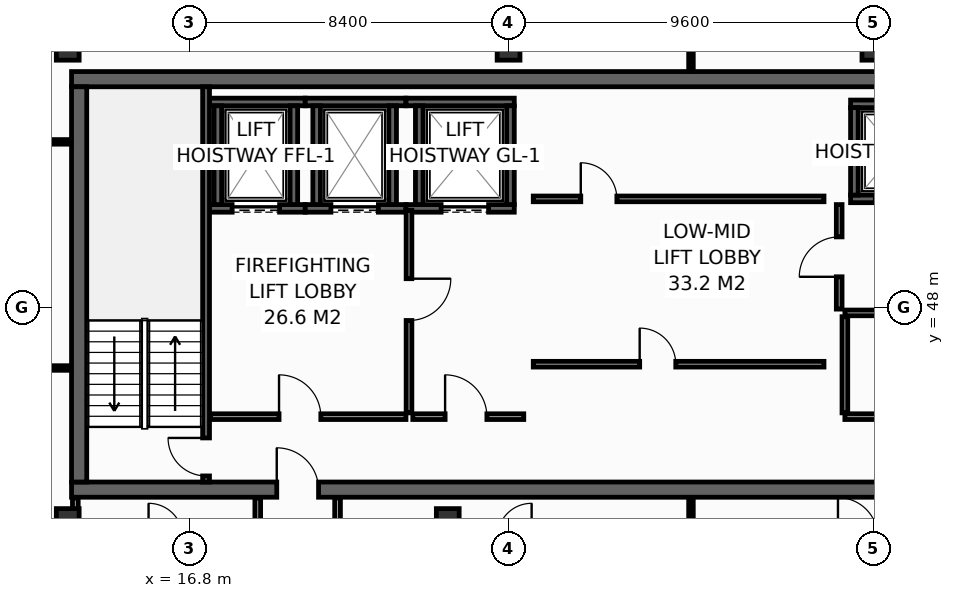
"""IFC4 building model, lengths in metres.
Left out: names, types, materials, properties, quantities, classifications, styles, units other than length and angle.
Written with IfcOpenShell. Run it as: python <this file> out.ifc"""

import sys

from ifc_helpers import new_model, si_unit, direction, frame, frame_2d, origin, origin_2d, place, context, subcontext, project, spatial, rectangle, hollow_rectangle, extrude, element, fill, save


model = new_model("IFC4")
c1 = context("Model", 3, precision=1e-05, world=origin(), true_north=direction((0.0, 1.0)))
c2 = subcontext(c1, "Body", "Model", "MODEL_VIEW")
j1 = project(units=[si_unit("LENGTHUNIT", "METRE"), si_unit("PLANEANGLEUNIT", "RADIAN")], contexts=[c1])
p1 = place(None, origin())
s1 = spatial("IfcSite", under=j1, at=p1, CompositionType="ELEMENT")
p2 = place(p1, origin())
s2 = spatial("IfcBuilding", under=s1, at=p2, CompositionType="ELEMENT")
p3 = place(p2, frame((0.0, 0.0, 310.4)))
s3 = spatial("IfcBuildingStorey", under=s2, at=p3, CompositionType="ELEMENT", Elevation=310.4)
p4 = place(p3, frame((13.7, 43.2, 0.0), z_axis=(0.0, 0.0, 1.0), x_axis=(1.0, 0.0, 0.0)))
e1 = element("IfcWall", 1, at=p4, inside=s3, PredefinedType="SHEAR", context=c2, shape_type="SweptSolid", body=[
    extrude(rectangle(XDim=32.5, YDim=0.4, at=frame_2d((16.25, 0.0))), origin(), (0.0, 0.0, 1.0), 3.55),
])
p5 = place(p4, frame((5.4, 0.0, 0.0)))
e2 = element("IfcOpeningElement", 2, at=p5, cuts=e1, PredefinedType="OPENING", context=c2, shape_type="SweptSolid", body=[
    extrude(rectangle(XDim=1.1, YDim=2.15, at=frame_2d((0.55, 1.075))), frame((0.0, 0.21, 0.0), z_axis=(0.0, -1.0, 0.0), x_axis=(1.0, 0.0, 0.0)), (0.0, 0.0, 1.0), 0.42),
])
p6 = place(p4, frame((25.6, 0.0, 0.0)))
e3 = element("IfcOpeningElement", 3, at=p6, cuts=e1, PredefinedType="OPENING", context=c2, shape_type="SweptSolid", body=[
    extrude(rectangle(XDim=1.1, YDim=2.15, at=frame_2d((0.55, 1.075))), frame((0.0, 0.21, 0.0), z_axis=(0.0, -1.0, 0.0), x_axis=(1.0, 0.0, 0.0)), (0.0, 0.0, 1.0), 0.42),
])
p7 = place(p3, frame((13.7, 54.0, 0.0), z_axis=(0.0, 0.0, 1.0), x_axis=(1.0, 0.0, 0.0)))
e4 = element("IfcWall", 4, at=p7, inside=s3, PredefinedType="SHEAR", context=c2, shape_type="SweptSolid", body=[
    extrude(rectangle(XDim=32.5, YDim=0.4, at=frame_2d((16.25, 0.0))), origin(), (0.0, 0.0, 1.0), 3.55),
])
p8 = place(p3, frame((13.9, 43.4, 0.0), z_axis=(0.0, 0.0, 1.0), x_axis=(0.0, 1.0, 0.0)))
e5 = element("IfcWall", 5, at=p8, inside=s3, PredefinedType="SHEAR", context=c2, shape_type="SweptSolid", body=[
    extrude(rectangle(XDim=10.4, YDim=0.4, at=frame_2d((5.2, 0.0))), origin(), (0.0, 0.0, 1.0), 3.55),
])
for number, where, z_axis, x_axis in (
    (6, (13.6, 54.8, 0.0), (0.0, 0.0, 1.0), (1.0, 0.0, 0.0)),
    (7, (25.2, 54.8, 0.0), (0.0, 0.0, 1.0), (1.0, 0.0, 0.0)),
    (8, (34.8, 54.8, 0.0), (0.0, 0.0, 1.0), (1.0, 0.0, 0.0)),
    (9, (13.6, 42.4, 0.0), (0.0, 0.0, 1.0), (1.0, 0.0, 0.0)),
    (10, (23.6, 42.4, 0.0), (0.0, 0.0, 1.0), (1.0, 0.0, 0.0)),
):
    element("IfcColumn", number, at=place(p3, frame(where, z_axis=z_axis, x_axis=x_axis)), inside=s3, PredefinedType="COLUMN", context=c2, shape_type="SweptSolid", body=[
        extrude(hollow_rectangle(XDim=0.6, YDim=0.6, WallThickness=0.028, at=origin_2d()), origin(), (0.0, 0.0, 1.0), 3.8),
    ])
p9 = place(p3, frame((17.33, 50.6, 0.0), z_axis=(0.0, 0.0, 1.0), x_axis=(1.0, 0.0, 0.0)))
e11 = element("IfcWall", 11, at=p9, inside=s3, PredefinedType="SHEAR", context=c2, shape_type="SweptSolid", body=[
    extrude(rectangle(XDim=2.52, YDim=0.2, at=frame_2d((1.26, 0.0))), origin(), (0.0, 0.0, 1.0), 3.55),
])
p10 = place(p9, frame((0.595, 0.0, 0.0)))
e12 = element("IfcOpeningElement", 12, at=p10, cuts=e11, PredefinedType="OPENING", context=c2, shape_type="SweptSolid", body=[
    extrude(rectangle(XDim=1.25, YDim=2.3, at=frame_2d((0.625, 1.15))), frame((0.0, 0.11, 0.0), z_axis=(0.0, -1.0, 0.0), x_axis=(1.0, 0.0, 0.0)), (0.0, 0.0, 1.0), 0.22),
])
p11 = place(p3, frame((17.33, 53.4, 0.0), z_axis=(0.0, 0.0, 1.0), x_axis=(1.0, 0.0, 0.0)))
e13 = element("IfcWall", 13, at=p11, inside=s3, PredefinedType="SHEAR", context=c2, shape_type="SweptSolid", body=[
    extrude(rectangle(XDim=2.52, YDim=0.2, at=frame_2d((1.26, 0.0))), origin(), (0.0, 0.0, 1.0), 3.55),
])
for number, where, z_axis, x_axis in (
    (14, (17.55, 50.7, 0.0), (0.0, 0.0, 1.0), (0.0, 1.0, 0.0)),
    (15, (19.55, 50.7, 0.0), (0.0, 0.0, 1.0), (0.0, 1.0, 0.0)),
):
    element("IfcWall", number, at=place(p3, frame(where, z_axis=z_axis, x_axis=x_axis)), inside=s3, PredefinedType="SHEAR", context=c2, shape_type="SweptSolid", body=[
        extrude(rectangle(XDim=2.6, YDim=0.2, at=frame_2d((1.3, 0.0))), origin(), (0.0, 0.0, 1.0), 3.55),
    ])
p12 = place(p3, frame((19.85, 50.6, 0.0), z_axis=(0.0, 0.0, 1.0), x_axis=(1.0, 0.0, 0.0)))
e16 = element("IfcWall", 16, at=p12, inside=s3, PredefinedType="SHEAR", context=c2, shape_type="SweptSolid", body=[
    extrude(rectangle(XDim=2.65, YDim=0.2, at=frame_2d((1.325, 0.0))), origin(), (0.0, 0.0, 1.0), 3.55),
])
p13 = place(p12, frame((0.675, 0.0, 0.0)))
e17 = element("IfcOpeningElement", 17, at=p13, cuts=e16, PredefinedType="OPENING", context=c2, shape_type="SweptSolid", body=[
    extrude(rectangle(XDim=1.25, YDim=2.3, at=frame_2d((0.625, 1.15))), frame((0.0, 0.11, 0.0), z_axis=(0.0, -1.0, 0.0), x_axis=(1.0, 0.0, 0.0)), (0.0, 0.0, 1.0), 0.22),
])
p14 = place(p3, frame((19.85, 53.4, 0.0), z_axis=(0.0, 0.0, 1.0), x_axis=(1.0, 0.0, 0.0)))
e18 = element("IfcWall", 18, at=p14, inside=s3, PredefinedType="SHEAR", context=c2, shape_type="SweptSolid", body=[
    extrude(rectangle(XDim=2.65, YDim=0.2, at=frame_2d((1.325, 0.0))), origin(), (0.0, 0.0, 1.0), 3.55),
])
for number, where, z_axis, x_axis in (
    (19, (20.15, 50.7, 0.0), (0.0, 0.0, 1.0), (0.0, 1.0, 0.0)),
    (20, (22.15, 50.7, 0.0), (0.0, 0.0, 1.0), (0.0, 1.0, 0.0)),
):
    element("IfcWall", number, at=place(p3, frame(where, z_axis=z_axis, x_axis=x_axis)), inside=s3, PredefinedType="SHEAR", context=c2, shape_type="SweptSolid", body=[
        extrude(rectangle(XDim=2.6, YDim=0.2, at=frame_2d((1.3, 0.0))), origin(), (0.0, 0.0, 1.0), 3.55),
    ])
p15 = place(p3, frame((22.5, 50.6, 0.0), z_axis=(0.0, 0.0, 1.0), x_axis=(1.0, 0.0, 0.0)))
e21 = element("IfcWall", 21, at=p15, inside=s3, PredefinedType="SHEAR", context=c2, shape_type="SweptSolid", body=[
    extrude(rectangle(XDim=2.85, YDim=0.2, at=frame_2d((1.425, 0.0))), origin(), (0.0, 0.0, 1.0), 3.55),
])
p16 = place(p15, frame((0.925, 0.0, 0.0)))
e22 = element("IfcOpeningElement", 22, at=p16, cuts=e21, PredefinedType="OPENING", context=c2, shape_type="SweptSolid", body=[
    extrude(rectangle(XDim=1.25, YDim=2.3, at=frame_2d((0.625, 1.15))), frame((0.0, 0.11, 0.0), z_axis=(0.0, -1.0, 0.0), x_axis=(1.0, 0.0, 0.0)), (0.0, 0.0, 1.0), 0.22),
])
p17 = place(p3, frame((22.5, 53.4, 0.0), z_axis=(0.0, 0.0, 1.0), x_axis=(1.0, 0.0, 0.0)))
e23 = element("IfcWall", 23, at=p17, inside=s3, PredefinedType="SHEAR", context=c2, shape_type="SweptSolid", body=[
    extrude(rectangle(XDim=2.85, YDim=0.2, at=frame_2d((1.425, 0.0))), origin(), (0.0, 0.0, 1.0), 3.55),
])
for number, where, z_axis, x_axis in (
    (24, (22.85, 50.7, 0.0), (0.0, 0.0, 1.0), (0.0, 1.0, 0.0)),
    (25, (25.25, 50.7, 0.0), (0.0, 0.0, 1.0), (0.0, 1.0, 0.0)),
):
    element("IfcWall", number, at=place(p3, frame(where, z_axis=z_axis, x_axis=x_axis)), inside=s3, PredefinedType="SHEAR", context=c2, shape_type="SweptSolid", body=[
        extrude(rectangle(XDim=2.6, YDim=0.2, at=frame_2d((1.3, 0.0))), origin(), (0.0, 0.0, 1.0), 3.55),
    ])
p18 = place(p3, frame((34.2, 50.85, 0.0), z_axis=(0.0, 0.0, 1.0), x_axis=(1.0, 0.0, 0.0)))
e26 = element("IfcWall", 26, at=p18, inside=s3, PredefinedType="SHEAR", context=c2, shape_type="SweptSolid", body=[
    extrude(rectangle(XDim=2.575, YDim=0.2, at=frame_2d((1.288, 0.0))), origin(), (0.0, 0.0, 1.0), 3.55),
])
p19 = place(p18, frame((0.65, 0.0, 0.0)))
e27 = element("IfcOpeningElement", 27, at=p19, cuts=e26, PredefinedType="OPENING", context=c2, shape_type="SweptSolid", body=[
    extrude(rectangle(XDim=1.1, YDim=2.2, at=frame_2d((0.55, 1.1))), frame((0.0, 0.11, 0.0), z_axis=(0.0, -1.0, 0.0), x_axis=(1.0, 0.0, 0.0)), (0.0, 0.0, 1.0), 0.22),
])
p20 = place(p3, frame((34.2, 53.35, 0.0), z_axis=(0.0, 0.0, 1.0), x_axis=(1.0, 0.0, 0.0)))
e28 = element("IfcWall", 28, at=p20, inside=s3, PredefinedType="SHEAR", context=c2, shape_type="SweptSolid", body=[
    extrude(rectangle(XDim=2.575, YDim=0.2, at=frame_2d((1.288, 0.0))), origin(), (0.0, 0.0, 1.0), 3.55),
])
p21 = place(p3, frame((34.3, 50.95, 0.0), z_axis=(0.0, 0.0, 1.0), x_axis=(0.0, 1.0, 0.0)))
e29 = element("IfcWall", 29, at=p21, inside=s3, PredefinedType="SHEAR", context=c2, shape_type="SweptSolid", body=[
    extrude(rectangle(XDim=2.3, YDim=0.2, at=frame_2d((1.15, 0.0))), origin(), (0.0, 0.0, 1.0), 3.55),
])
p22 = place(p3, frame((17.24, 43.4, 0.0), z_axis=(0.0, 0.0, 1.0), x_axis=(0.0, 1.0, 0.0)))
e30 = element("IfcWall", 30, at=p22, inside=s3, PredefinedType="SHEAR", context=c2, shape_type="SweptSolid", body=[
    extrude(rectangle(XDim=10.4, YDim=0.18, at=frame_2d((5.2, 0.0))), origin(), (0.0, 0.0, 1.0), 3.55),
])
p23 = place(p22, frame((0.16, 0.0, 0.0)))
e31 = element("IfcOpeningElement", 31, at=p23, cuts=e30, PredefinedType="OPENING", context=c2, shape_type="SweptSolid", body=[
    extrude(rectangle(XDim=1.0, YDim=2.15, at=frame_2d((0.5, 1.075))), frame((0.0, 0.1, 0.0), z_axis=(0.0, -1.0, 0.0), x_axis=(1.0, 0.0, 0.0)), (0.0, 0.0, 1.0), 0.2),
])
p24 = place(p3, frame((17.36, 45.12, 0.0), z_axis=(0.0, 0.0, 1.0), x_axis=(1.0, 0.0, 0.0)))
e32 = element("IfcWall", 32, at=p24, inside=s3, PredefinedType="PARTITIONING", context=c2, shape_type="SweptSolid", body=[
    extrude(rectangle(XDim=5.14, YDim=0.15, at=frame_2d((2.57, 0.0))), origin(), (0.0, 0.0, 1.0), 3.55),
])
p25 = place(p24, frame((1.8, 0.0, 0.0)))
e33 = element("IfcOpeningElement", 33, at=p25, cuts=e32, PredefinedType="OPENING", context=c2, shape_type="SweptSolid", body=[
    extrude(rectangle(XDim=1.1, YDim=2.15, at=frame_2d((0.55, 1.075))), frame((0.0, 0.085, 0.0), z_axis=(0.0, -1.0, 0.0), x_axis=(1.0, 0.0, 0.0)), (0.0, 0.0, 1.0), 0.17),
])
p26 = place(p3, frame((22.58, 50.55, 0.0), z_axis=(0.0, 0.0, 1.0), x_axis=(0.0, -1.0, 0.0)))
e34 = element("IfcWall", 34, at=p26, inside=s3, PredefinedType="PARTITIONING", context=c2, shape_type="SweptSolid", body=[
    extrude(rectangle(XDim=5.33, YDim=0.15, at=frame_2d((2.665, 0.0))), origin(), (0.0, 0.0, 1.0), 3.55),
])
p27 = place(p26, frame((1.8, 0.0, 0.0)))
e35 = element("IfcOpeningElement", 35, at=p27, cuts=e34, PredefinedType="OPENING", context=c2, shape_type="SweptSolid", body=[
    extrude(rectangle(XDim=1.1, YDim=2.15, at=frame_2d((0.55, 1.075))), frame((0.0, 0.085, 0.0), z_axis=(0.0, -1.0, 0.0), x_axis=(1.0, 0.0, 0.0)), (0.0, 0.0, 1.0), 0.17),
])
p28 = place(p3, frame((22.68, 45.12, 0.0), z_axis=(0.0, 0.0, 1.0), x_axis=(1.0, 0.0, 0.0)))
e36 = element("IfcWall", 36, at=p28, inside=s3, PredefinedType="PARTITIONING", context=c2, shape_type="SweptSolid", body=[
    extrude(rectangle(XDim=2.92, YDim=0.15, at=frame_2d((1.46, 0.0))), origin(), (0.0, 0.0, 1.0), 3.55),
])
p29 = place(p28, frame((0.85, 0.0, 0.0)))
e37 = element("IfcOpeningElement", 37, at=p29, cuts=e36, PredefinedType="OPENING", context=c2, shape_type="SweptSolid", body=[
    extrude(rectangle(XDim=1.1, YDim=2.15, at=frame_2d((0.55, 1.075))), frame((0.0, 0.085, 0.0), z_axis=(0.0, -1.0, 0.0), x_axis=(1.0, 0.0, 0.0)), (0.0, 0.0, 1.0), 0.17),
])
p30 = place(p3, frame((33.9, 47.95, 0.0), z_axis=(0.0, 0.0, 1.0), x_axis=(0.0, 1.0, 0.0)))
e38 = element("IfcWall", 38, at=p30, inside=s3, PredefinedType="PARTITIONING", context=c2, shape_type="SweptSolid", body=[
    extrude(rectangle(XDim=2.75, YDim=0.15, at=frame_2d((1.375, 0.0))), origin(), (0.0, 0.0, 1.0), 3.55),
])
p31 = place(p30, frame((0.85, 0.0, 0.0)))
e39 = element("IfcOpeningElement", 39, at=p31, cuts=e38, PredefinedType="OPENING", context=c2, shape_type="SweptSolid", body=[
    extrude(rectangle(XDim=1.05, YDim=2.15, at=frame_2d((0.525, 1.075))), frame((0.0, 0.085, 0.0), z_axis=(0.0, -1.0, 0.0), x_axis=(1.0, 0.0, 0.0)), (0.0, 0.0, 1.0), 0.17),
])
p32 = place(p3, frame((34.05, 45.12, 0.0), z_axis=(0.0, 0.0, 1.0), x_axis=(1.0, 0.0, 0.0)))
e40 = element("IfcWall", 40, at=p32, inside=s3, PredefinedType="PARTITIONING", context=c2, shape_type="SweptSolid", body=[
    extrude(rectangle(XDim=8.45, YDim=0.15, at=frame_2d((4.225, 0.0))), origin(), (0.0, 0.0, 1.0), 3.55),
])
p33 = place(p32, frame((1.5, 0.0, 0.0)))
e41 = element("IfcOpeningElement", 41, at=p33, cuts=e40, PredefinedType="OPENING", context=c2, shape_type="SweptSolid", body=[
    extrude(rectangle(XDim=0.95, YDim=2.15, at=frame_2d((0.475, 1.075))), frame((0.0, 0.085, 0.0), z_axis=(0.0, -1.0, 0.0), x_axis=(1.0, 0.0, 0.0)), (0.0, 0.0, 1.0), 0.17),
])
p34 = place(p32, frame((5.8, 0.0, 0.0)))
e42 = element("IfcOpeningElement", 42, at=p34, cuts=e40, PredefinedType="OPENING", context=c2, shape_type="SweptSolid", body=[
    extrude(rectangle(XDim=0.95, YDim=2.15, at=frame_2d((0.475, 1.075))), frame((0.0, 0.085, 0.0), z_axis=(0.0, -1.0, 0.0), x_axis=(1.0, 0.0, 0.0)), (0.0, 0.0, 1.0), 0.17),
])
p35 = place(p3, frame((34.05, 47.85, 0.0), z_axis=(0.0, 0.0, 1.0), x_axis=(1.0, 0.0, 0.0)))
e43 = element("IfcWall", 43, at=p35, inside=s3, PredefinedType="PARTITIONING", context=c2, shape_type="SweptSolid", body=[
    extrude(rectangle(XDim=8.45, YDim=0.15, at=frame_2d((4.225, 0.0))), origin(), (0.0, 0.0, 1.0), 3.55),
])
p36 = place(p3, frame((34.05, 45.22, 0.0), z_axis=(0.0, 0.0, 1.0), x_axis=(0.0, 1.0, 0.0)))
e44 = element("IfcWall", 44, at=p36, inside=s3, PredefinedType="PARTITIONING", context=c2, shape_type="SweptSolid", body=[
    extrude(rectangle(XDim=2.53, YDim=0.15, at=frame_2d((1.265, 0.0))), origin(), (0.0, 0.0, 1.0), 3.55),
])
p37 = place(p3, frame((25.85, 50.85, 0.0), z_axis=(0.0, 0.0, 1.0), x_axis=(1.0, 0.0, 0.0)))
e45 = element("IfcWall", 45, at=p37, inside=s3, PredefinedType="PARTITIONING", context=c2, shape_type="SweptSolid", body=[
    extrude(rectangle(XDim=7.65, YDim=0.15, at=frame_2d((3.825, 0.0))), origin(), (0.0, 0.0, 1.0), 3.55),
])
p38 = place(p37, frame((1.25, 0.0, 0.0)))
e46 = element("IfcOpeningElement", 46, at=p38, cuts=e45, PredefinedType="OPENING", context=c2, shape_type="SweptSolid", body=[
    extrude(rectangle(XDim=0.95, YDim=2.15, at=frame_2d((0.475, 1.075))), frame((0.0, 0.085, 0.0), z_axis=(0.0, -1.0, 0.0), x_axis=(1.0, 0.0, 0.0)), (0.0, 0.0, 1.0), 0.17),
])
p39 = place(p3, frame((25.85, 46.5, 0.0), z_axis=(0.0, 0.0, 1.0), x_axis=(1.0, 0.0, 0.0)))
e47 = element("IfcWall", 47, at=p39, inside=s3, PredefinedType="PARTITIONING", context=c2, shape_type="SweptSolid", body=[
    extrude(rectangle(XDim=7.65, YDim=0.15, at=frame_2d((3.825, 0.0))), origin(), (0.0, 0.0, 1.0), 3.55),
])
p40 = place(p39, frame((2.8, 0.0, 0.0)))
e48 = element("IfcOpeningElement", 48, at=p40, cuts=e47, PredefinedType="OPENING", context=c2, shape_type="SweptSolid", body=[
    extrude(rectangle(XDim=0.95, YDim=2.15, at=frame_2d((0.475, 1.075))), frame((0.0, 0.085, 0.0), z_axis=(0.0, -1.0, 0.0), x_axis=(1.0, 0.0, 0.0)), (0.0, 0.0, 1.0), 0.17),
])
p41 = place(p3, frame((11.5, 52.35, 0.0), z_axis=(0.0, 0.0, 1.0), x_axis=(1.0, 0.0, 0.0)))
e49 = element("IfcWall", 49, at=p41, inside=s3, PredefinedType="PARTITIONING", context=c2, shape_type="SweptSolid", body=[
    extrude(rectangle(XDim=2.18, YDim=0.12, at=frame_2d((1.09, 0.0))), origin(), (0.0, 0.0, 1.0), 3.55),
])
p42 = place(p3, frame((30.0, 54.22, 0.0), z_axis=(0.0, 0.0, 1.0), x_axis=(0.0, 1.0, 0.0)))
e50 = element("IfcWall", 50, at=p42, inside=s3, PredefinedType="PARTITIONING", context=c2, shape_type="SweptSolid", body=[
    extrude(rectangle(XDim=1.775, YDim=0.12, at=frame_2d((0.888, 0.0))), origin(), (0.0, 0.0, 1.0), 2.935),
])
p43 = place(p3, frame((11.5, 46.4, 0.0), z_axis=(0.0, 0.0, 1.0), x_axis=(1.0, 0.0, 0.0)))
e51 = element("IfcWall", 51, at=p43, inside=s3, PredefinedType="PARTITIONING", context=c2, shape_type="SweptSolid", body=[
    extrude(rectangle(XDim=2.18, YDim=0.12, at=frame_2d((1.09, 0.0))), origin(), (0.0, 0.0, 1.0), 3.55),
])
p44 = place(p3, frame((13.8, 42.02, 0.0), z_axis=(0.0, 0.0, 1.0), x_axis=(0.0, 1.0, 0.0)))
e52 = element("IfcWall", 52, at=p44, inside=s3, PredefinedType="PARTITIONING", context=c2, shape_type="SweptSolid", body=[
    extrude(rectangle(XDim=0.96, YDim=0.15, at=frame_2d((0.48, 0.0))), origin(), (0.0, 0.0, 1.0), 3.55),
])
for number, where, z_axis, x_axis in (
    (53, (18.6, 41.94, 0.0), (0.0, 0.0, 1.0), (0.0, 1.0, 0.0)),
    (54, (20.7, 41.94, 0.0), (0.0, 0.0, 1.0), (0.0, 1.0, 0.0)),
):
    element("IfcWall", number, at=place(p3, frame(where, z_axis=z_axis, x_axis=x_axis)), inside=s3, PredefinedType="PARTITIONING", context=c2, shape_type="SweptSolid", body=[
        extrude(rectangle(XDim=1.04, YDim=0.15, at=frame_2d((0.52, 0.0))), origin(), (0.0, 0.0, 1.0), 3.55),
    ])
p45 = place(p3, frame((30.0, 41.94, 0.0), z_axis=(0.0, 0.0, 1.0), x_axis=(0.0, 1.0, 0.0)))
e55 = element("IfcWall", 55, at=p45, inside=s3, PredefinedType="PARTITIONING", context=c2, shape_type="SweptSolid", body=[
    extrude(rectangle(XDim=1.04, YDim=0.12, at=frame_2d((0.52, 0.0))), origin(), (0.0, 0.0, 1.0), 2.947),
])
p46 = place(p10, origin())
e56 = element("IfcDoor", 56, at=p46, inside=s3, OperationType="SLIDING_TO_LEFT", PredefinedType="DOOR", context=c2, shape_type="SweptSolid", body=[
    extrude(rectangle(XDim=1.25, YDim=2.3, at=frame_2d((0.625, 1.15))), frame((0.0, 0.025, 0.0), z_axis=(0.0, -1.0, 0.0), x_axis=(1.0, 0.0, 0.0)), (0.0, 0.0, 1.0), 0.05),
])
fill(e12, e56)
p47 = place(p13, origin())
e57 = element("IfcDoor", 57, at=p47, inside=s3, OperationType="SLIDING_TO_LEFT", PredefinedType="DOOR", context=c2, shape_type="SweptSolid", body=[
    extrude(rectangle(XDim=1.25, YDim=2.3, at=frame_2d((0.625, 1.15))), frame((0.0, 0.025, 0.0), z_axis=(0.0, -1.0, 0.0), x_axis=(1.0, 0.0, 0.0)), (0.0, 0.0, 1.0), 0.05),
])
fill(e17, e57)
p48 = place(p16, origin())
e58 = element("IfcDoor", 58, at=p48, inside=s3, OperationType="SLIDING_TO_LEFT", PredefinedType="DOOR", context=c2, shape_type="SweptSolid", body=[
    extrude(rectangle(XDim=1.25, YDim=2.3, at=frame_2d((0.625, 1.15))), frame((0.0, 0.025, 0.0), z_axis=(0.0, -1.0, 0.0), x_axis=(1.0, 0.0, 0.0)), (0.0, 0.0, 1.0), 0.05),
])
fill(e22, e58)
p49 = place(p23, origin())
e59 = element("IfcDoor", 59, at=p49, inside=s3, OperationType="SINGLE_SWING_RIGHT", PredefinedType="DOOR", context=c2, shape_type="SweptSolid", body=[
    extrude(rectangle(XDim=1.0, YDim=2.15, at=frame_2d((0.5, 1.075))), frame((0.0, 0.025, 0.0), z_axis=(0.0, -1.0, 0.0), x_axis=(1.0, 0.0, 0.0)), (0.0, 0.0, 1.0), 0.05),
])
fill(e31, e59)
p50 = place(p25, origin())
e60 = element("IfcDoor", 60, at=p50, inside=s3, OperationType="SINGLE_SWING_LEFT", PredefinedType="DOOR", context=c2, shape_type="SweptSolid", body=[
    extrude(rectangle(XDim=1.1, YDim=2.15, at=frame_2d((0.55, 1.075))), frame((0.0, 0.025, 0.0), z_axis=(0.0, -1.0, 0.0), x_axis=(1.0, 0.0, 0.0)), (0.0, 0.0, 1.0), 0.05),
])
fill(e33, e60)
p51 = place(p27, origin())
e61 = element("IfcDoor", 61, at=p51, inside=s3, OperationType="SINGLE_SWING_LEFT", PredefinedType="DOOR", context=c2, shape_type="SweptSolid", body=[
    extrude(rectangle(XDim=1.1, YDim=2.15, at=frame_2d((0.55, 1.075))), frame((0.0, 0.025, 0.0), z_axis=(0.0, -1.0, 0.0), x_axis=(1.0, 0.0, 0.0)), (0.0, 0.0, 1.0), 0.05),
])
fill(e35, e61)
p52 = place(p29, origin())
e62 = element("IfcDoor", 62, at=p52, inside=s3, OperationType="SINGLE_SWING_LEFT", PredefinedType="DOOR", context=c2, shape_type="SweptSolid", body=[
    extrude(rectangle(XDim=1.1, YDim=2.15, at=frame_2d((0.55, 1.075))), frame((0.0, 0.025, 0.0), z_axis=(0.0, -1.0, 0.0), x_axis=(1.0, 0.0, 0.0)), (0.0, 0.0, 1.0), 0.05),
])
fill(e37, e62)
p53 = place(p5, origin())
e63 = element("IfcDoor", 63, at=p53, inside=s3, OperationType="SINGLE_SWING_LEFT", PredefinedType="DOOR", context=c2, shape_type="SweptSolid", body=[
    extrude(rectangle(XDim=1.1, YDim=2.15, at=frame_2d((0.55, 1.075))), frame((0.0, 0.025, 0.0), z_axis=(0.0, -1.0, 0.0), x_axis=(1.0, 0.0, 0.0)), (0.0, 0.0, 1.0), 0.05),
])
fill(e2, e63)
p54 = place(p31, origin())
e64 = element("IfcDoor", 64, at=p54, inside=s3, OperationType="SINGLE_SWING_LEFT", PredefinedType="DOOR", context=c2, shape_type="SweptSolid", body=[
    extrude(rectangle(XDim=1.05, YDim=2.15, at=frame_2d((0.525, 1.075))), frame((0.0, 0.025, 0.0), z_axis=(0.0, -1.0, 0.0), x_axis=(1.0, 0.0, 0.0)), (0.0, 0.0, 1.0), 0.05),
])
fill(e39, e64)
p55 = place(p38, origin())
e65 = element("IfcDoor", 65, at=p55, inside=s3, OperationType="SINGLE_SWING_LEFT", PredefinedType="DOOR", context=c2, shape_type="SweptSolid", body=[
    extrude(rectangle(XDim=0.95, YDim=2.15, at=frame_2d((0.475, 1.075))), frame((0.0, 0.025, 0.0), z_axis=(0.0, -1.0, 0.0), x_axis=(1.0, 0.0, 0.0)), (0.0, 0.0, 1.0), 0.05),
])
fill(e46, e65)
p56 = place(p40, origin())
e66 = element("IfcDoor", 66, at=p56, inside=s3, OperationType="SINGLE_SWING_LEFT", PredefinedType="DOOR", context=c2, shape_type="SweptSolid", body=[
    extrude(rectangle(XDim=0.95, YDim=2.15, at=frame_2d((0.475, 1.075))), frame((0.0, 0.025, 0.0), z_axis=(0.0, -1.0, 0.0), x_axis=(1.0, 0.0, 0.0)), (0.0, 0.0, 1.0), 0.05),
])
fill(e48, e66)
save(model, sys.argv[1])
